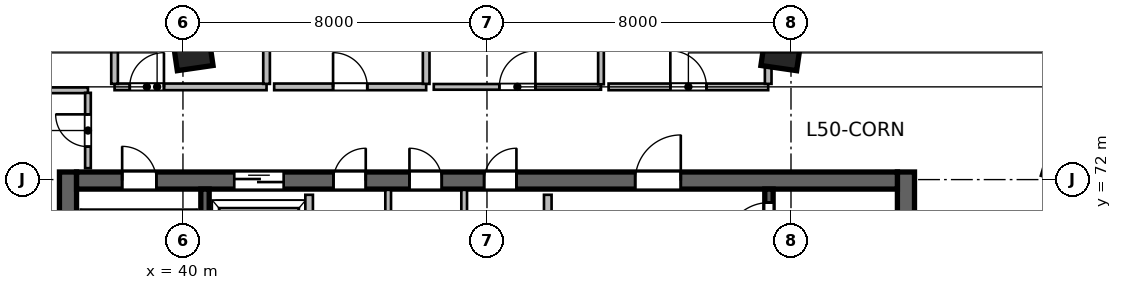
"""IFC4 building model, lengths in metres.
Left out: names, types, materials, properties, quantities, classifications, styles, units other than length and angle.
Written with IfcOpenShell. Run it as: python <this file> out.ifc"""

import sys

from ifc_helpers import new_model, si_unit, direction, frame, frame_2d, origin, origin_2d, place, context, subcontext, project, spatial, rectangle, extrude, source, transform, mapped, element, fill, save


model = new_model("IFC4")
c1 = context("Model", 3, precision=1e-05, world=origin(), true_north=direction((0.0, 1.0)))
c2 = subcontext(c1, "Body", "Model", "MODEL_VIEW")
j1 = project(units=[si_unit("LENGTHUNIT", "METRE"), si_unit("PLANEANGLEUNIT", "RADIAN")], contexts=[c1])
p1 = place(None, origin())
s1 = spatial("IfcSite", under=j1, at=p1, CompositionType="ELEMENT")
p2 = place(p1, origin())
s2 = spatial("IfcBuilding", under=s1, at=p2, CompositionType="ELEMENT")
p3 = place(p2, frame((0.0, 0.0, 207.9)))
s3 = spatial("IfcBuildingStorey", under=s2, at=p3, CompositionType="ELEMENT", Elevation=207.9)
m1 = source(origin(), c2, "Body", "SweptSolid", [
    extrude(rectangle(XDim=12.0, YDim=0.45, at=frame_2d((6.0, 0.0))), origin(), (0.0, 0.0, 1.0), 3.9),
])
for number, where, z_axis, x_axis in (
    (1, (36.975, 60.2, 0.0), (0.0, 0.0, 1.0), (0.0, 1.0, 0.0)),
    (2, (59.025, 60.2, 0.0), (0.0, 0.0, 1.0), (0.0, 1.0, 0.0)),
):
    element("IfcWall", number, at=place(p3, frame(where, z_axis=z_axis, x_axis=x_axis)), inside=s3, PredefinedType="SHEAR", context=c2, shape_type="MappedRepresentation", body=[
        mapped(m1, transform((0.0, 0.0, 0.0), scale=1.0)),
    ])
m2 = source(origin(), c2, "Body", "SweptSolid", [
    extrude(rectangle(XDim=21.6, YDim=0.45, at=frame_2d((10.8, 0.0))), origin(), (0.0, 0.0, 1.0), 3.9),
])
p4 = place(p3, frame((37.2, 71.975, 0.0), z_axis=(0.0, 0.0, 1.0), x_axis=(1.0, 0.0, 0.0)))
e3 = element("IfcWall", 3, at=p4, inside=s3, PredefinedType="SHEAR", context=c2, shape_type="MappedRepresentation", body=[
    mapped(m2, transform((0.0, 0.0, 0.0), scale=1.0)),
])
p5 = place(p4, frame((1.2, 0.0, 0.0)))
e4 = element("IfcOpeningElement", 4, at=p5, cuts=e3, PredefinedType="OPENING", context=c2, shape_type="SweptSolid", body=[
    extrude(rectangle(XDim=0.9, YDim=2.1, at=frame_2d((0.45, 1.05))), frame((0.0, 0.235, 0.0), z_axis=(0.0, -1.0, 0.0), x_axis=(1.0, 0.0, 0.0)), (0.0, 0.0, 1.0), 0.47),
])
p6 = place(p4, frame((14.7, 0.0, 0.0)))
e5 = element("IfcOpeningElement", 5, at=p6, cuts=e3, PredefinedType="OPENING", context=c2, shape_type="SweptSolid", body=[
    extrude(rectangle(XDim=1.2, YDim=2.15, at=frame_2d((0.6, 1.075))), frame((0.0, 0.235, 0.0), z_axis=(0.0, -1.0, 0.0), x_axis=(1.0, 0.0, 0.0)), (0.0, 0.0, 1.0), 0.47),
])
p7 = place(p4, frame((4.15, 0.0, 0.0)))
e6 = element("IfcOpeningElement", 6, at=p7, cuts=e3, PredefinedType="OPENING", context=c2, shape_type="SweptSolid", body=[
    extrude(rectangle(XDim=1.3, YDim=2.15, at=frame_2d((0.65, 1.075))), frame((0.0, 0.235, 0.0), z_axis=(0.0, -1.0, 0.0), x_axis=(1.0, 0.0, 0.0)), (0.0, 0.0, 1.0), 0.47),
])
p8 = place(p4, frame((6.76, 0.0, 0.0)))
e7 = element("IfcOpeningElement", 7, at=p8, cuts=e3, PredefinedType="OPENING", context=c2, shape_type="SweptSolid", body=[
    extrude(rectangle(XDim=0.85, YDim=2.1, at=frame_2d((0.425, 1.05))), frame((0.0, 0.235, 0.0), z_axis=(0.0, -1.0, 0.0), x_axis=(1.0, 0.0, 0.0)), (0.0, 0.0, 1.0), 0.47),
])
p9 = place(p4, frame((8.76, 0.0, 0.0)))
e8 = element("IfcOpeningElement", 8, at=p9, cuts=e3, PredefinedType="OPENING", context=c2, shape_type="SweptSolid", body=[
    extrude(rectangle(XDim=0.85, YDim=2.1, at=frame_2d((0.425, 1.05))), frame((0.0, 0.235, 0.0), z_axis=(0.0, -1.0, 0.0), x_axis=(1.0, 0.0, 0.0)), (0.0, 0.0, 1.0), 0.47),
])
p10 = place(p4, frame((10.725, 0.0, 0.0)))
e9 = element("IfcOpeningElement", 9, at=p10, cuts=e3, PredefinedType="OPENING", context=c2, shape_type="SweptSolid", body=[
    extrude(rectangle(XDim=0.85, YDim=2.1, at=frame_2d((0.425, 1.05))), frame((0.0, 0.235, 0.0), z_axis=(0.0, -1.0, 0.0), x_axis=(1.0, 0.0, 0.0)), (0.0, 0.0, 1.0), 0.47),
])
m3 = source(origin(), c2, "Body", "SweptSolid", [
    extrude(rectangle(XDim=11.1, YDim=0.22, at=frame_2d((5.55, 0.0))), origin(), (0.0, 0.0, 1.0), 3.9),
])
p11 = place(p3, frame((40.58, 60.65, 0.0), z_axis=(0.0, 0.0, 1.0), x_axis=(0.0, 1.0, 0.0)))
e10 = element("IfcWall", 10, at=p11, inside=s3, PredefinedType="SHEAR", context=c2, shape_type="MappedRepresentation", body=[
    mapped(m3, transform((0.0, 0.0, 0.0), scale=1.0)),
])
p12 = place(p3, frame((55.42, 60.65, 0.0), z_axis=(0.0, 0.0, 1.0), x_axis=(0.0, 1.0, 0.0)))
e11 = element("IfcWall", 11, at=p12, inside=s3, PredefinedType="SHEAR", context=c2, shape_type="MappedRepresentation", body=[
    mapped(m3, transform((0.0, 0.0, 0.0), scale=1.0)),
])
p13 = place(p12, frame((9.595, 0.0, 0.0)))
e12 = element("IfcOpeningElement", 12, at=p13, cuts=e11, PredefinedType="OPENING", context=c2, shape_type="SweptSolid", body=[
    extrude(rectangle(XDim=1.15, YDim=2.15, at=frame_2d((0.575, 1.075))), frame((0.0, 0.12, 0.0), z_axis=(0.0, -1.0, 0.0), x_axis=(1.0, 0.0, 0.0)), (0.0, 0.0, 1.0), 0.24),
])
m4 = source(origin(), c2, "Body", "SweptSolid", [
    extrude(rectangle(XDim=0.95, YDim=0.95, at=origin_2d()), origin(), (0.0, 0.0, 1.0), 3.9),
])
for number, where, z_axis, x_axis in (
    (13, (40.253, 75.404, 0.0), (0.0, 0.0, 1.0), (-0.143, 0.99, 0.0)),
    (14, (55.747, 75.404, 0.0), (0.0, 0.0, 1.0), (0.143, 0.99, 0.0)),
):
    element("IfcColumn", number, at=place(p3, frame(where, z_axis=z_axis, x_axis=x_axis)), inside=s3, PredefinedType="COLUMN", context=c2, shape_type="MappedRepresentation", body=[
        mapped(m4, transform((0.0, 0.0, 0.0), scale=1.0)),
    ])
m5 = source(origin(), c2, "Body", "SweptSolid", [
    extrude(rectangle(XDim=5.8, YDim=0.2, at=frame_2d((2.9, 0.0))), origin(), (0.0, 0.0, 1.0), 3.64),
])
p14 = place(p3, frame((49.6, 65.8, 0.0), z_axis=(0.0, 0.0, 1.0), x_axis=(0.0, 1.0, 0.0)))
e15 = element("IfcWall", 15, at=p14, inside=s3, PredefinedType="SOLIDWALL", context=c2, shape_type="MappedRepresentation", body=[
    mapped(m5, transform((0.0, 0.0, 0.0), scale=1.0)),
])
m6 = source(origin(), c2, "Body", "SweptSolid", [
    extrude(rectangle(XDim=3.2, YDim=0.2, at=frame_2d((1.6, 0.0))), origin(), (0.0, 0.0, 1.0), 3.64),
])
p15 = place(p3, frame((43.32, 68.4, 0.0), z_axis=(0.0, 0.0, 1.0), x_axis=(0.0, 1.0, 0.0)))
e16 = element("IfcWall", 16, at=p15, inside=s3, PredefinedType="SOLIDWALL", context=c2, shape_type="MappedRepresentation", body=[
    mapped(m6, transform((0.0, 0.0, 0.0), scale=1.0)),
])
m7 = source(origin(), c2, "Body", "SweptSolid", [
    extrude(rectangle(XDim=3.33, YDim=0.15, at=frame_2d((1.665, 0.0))), origin(), (0.0, 0.0, 1.0), 3.64),
])
for number, where, z_axis, x_axis in (
    (17, (45.4, 68.4, 0.0), (0.0, 0.0, 1.0), (0.0, 1.0, 0.0)),
    (18, (47.4, 68.4, 0.0), (0.0, 0.0, 1.0), (0.0, 1.0, 0.0)),
):
    element("IfcWall", number, at=place(p3, frame(where, z_axis=z_axis, x_axis=x_axis)), inside=s3, PredefinedType="PARTITIONING", context=c2, shape_type="MappedRepresentation", body=[
        mapped(m7, transform((0.0, 0.0, 0.0), scale=1.0)),
    ])
m8 = source(origin(), c2, "Body", "SweptSolid", [
    extrude(rectangle(XDim=3.1, YDim=0.15, at=frame_2d((1.55, 0.0))), origin(), (0.0, 0.0, 1.0), 3.071),
])
p16 = place(p3, frame((34.4, 74.35, 0.0), z_axis=(0.0, 0.0, 1.0), x_axis=(1.0, 0.0, 0.0)))
e19 = element("IfcWall", 19, at=p16, inside=s3, PredefinedType="PARTITIONING", context=c2, shape_type="MappedRepresentation", body=[
    mapped(m8, transform((0.0, 0.0, 0.0), scale=1.0)),
])
m9 = source(origin(), c2, "Body", "SweptSolid", [
    extrude(rectangle(XDim=1.982, YDim=0.15, at=frame_2d((0.991, 0.0))), origin(), (0.0, 0.0, 1.0), 3.64),
])
p17 = place(p3, frame((37.5, 72.3, 0.0), z_axis=(0.0, 0.0, 1.0), x_axis=(0.0, 1.0, 0.0)))
e20 = element("IfcWall", 20, at=p17, inside=s3, PredefinedType="PARTITIONING", context=c2, shape_type="MappedRepresentation", body=[
    mapped(m9, transform((0.0, 0.0, 0.0), scale=1.0)),
])
p18 = place(p17, frame((0.566, 0.0, 0.0)))
e21 = element("IfcOpeningElement", 21, at=p18, cuts=e20, PredefinedType="OPENING", context=c2, shape_type="SweptSolid", body=[
    extrude(rectangle(XDim=0.85, YDim=2.1, at=frame_2d((0.425, 1.05))), frame((0.0, 0.085, 0.0), z_axis=(0.0, -1.0, 0.0), x_axis=(1.0, 0.0, 0.0)), (0.0, 0.0, 1.0), 0.17),
])
m10 = source(origin(), c2, "Body", "SweptSolid", [
    extrude(rectangle(XDim=4.0, YDim=0.175, at=frame_2d((2.0, 0.0))), origin(), (0.0, 0.0, 1.0), 3.64),
])
p19 = place(p3, frame((38.2, 74.44, 0.0), z_axis=(0.0, 0.0, 1.0), x_axis=(1.0, 0.0, 0.0)))
e22 = element("IfcWall", 22, at=p19, inside=s3, PredefinedType="PARTITIONING", context=c2, shape_type="MappedRepresentation", body=[
    mapped(m10, transform((0.0, 0.0, 0.0), scale=1.0)),
])
p20 = place(p19, frame((0.4, 0.0, 0.0)))
e23 = element("IfcOpeningElement", 23, at=p20, cuts=e22, PredefinedType="OPENING", context=c2, shape_type="SweptSolid", body=[
    extrude(rectangle(XDim=0.9, YDim=2.08, at=frame_2d((0.45, 1.04))), frame((0.0, 0.098, 0.0), z_axis=(0.0, -1.0, 0.0), x_axis=(1.0, 0.0, 0.0)), (0.0, 0.0, 1.0), 0.195),
])
m11 = source(origin(), c2, "Body", "SweptSolid", [
    extrude(rectangle(XDim=2.403, YDim=0.175, at=frame_2d((1.201, 0.0))), origin(), (0.0, 0.0, 1.0), 3.64),
])
for number, where, z_axis, x_axis in (
    (24, (38.2, 74.519, 0.0), (0.0, 0.0, 1.0), (0.0, 1.0, 0.0)),
    (25, (42.2, 74.519, 0.0), (0.0, 0.0, 1.0), (0.0, 1.0, 0.0)),
):
    element("IfcWall", number, at=place(p3, frame(where, z_axis=z_axis, x_axis=x_axis)), inside=s3, PredefinedType="PARTITIONING", context=c2, shape_type="MappedRepresentation", body=[
        mapped(m11, transform((0.0, 0.0, 0.0), scale=1.0)),
    ])
p21 = place(p3, frame((42.4, 74.44, 0.0), z_axis=(0.0, 0.0, 1.0), x_axis=(1.0, 0.0, 0.0)))
e26 = element("IfcWall", 26, at=p21, inside=s3, PredefinedType="PARTITIONING", context=c2, shape_type="MappedRepresentation", body=[
    mapped(m10, transform((0.0, 0.0, 0.0), scale=1.0)),
])
p22 = place(p21, frame((1.55, 0.0, 0.0)))
e27 = element("IfcOpeningElement", 27, at=p22, cuts=e26, PredefinedType="OPENING", context=c2, shape_type="SweptSolid", body=[
    extrude(rectangle(XDim=0.9, YDim=2.08, at=frame_2d((0.45, 1.04))), frame((0.0, 0.098, 0.0), z_axis=(0.0, -1.0, 0.0), x_axis=(1.0, 0.0, 0.0)), (0.0, 0.0, 1.0), 0.195),
])
p23 = place(p3, frame((46.4, 74.519, 0.0), z_axis=(0.0, 0.0, 1.0), x_axis=(0.0, 1.0, 0.0)))
e28 = element("IfcWall", 28, at=p23, inside=s3, PredefinedType="PARTITIONING", context=c2, shape_type="MappedRepresentation", body=[
    mapped(m11, transform((0.0, 0.0, 0.0), scale=1.0)),
])
m12 = source(origin(), c2, "Body", "SweptSolid", [
    extrude(rectangle(XDim=4.4, YDim=0.15, at=frame_2d((2.2, 0.0))), origin(), (0.0, 0.0, 1.0), 3.64),
])
p24 = place(p3, frame((46.6, 74.44, 0.0), z_axis=(0.0, 0.0, 1.0), x_axis=(1.0, 0.0, 0.0)))
e29 = element("IfcWall", 29, at=p24, inside=s3, PredefinedType="PARTITIONING", context=c2, shape_type="MappedRepresentation", body=[
    mapped(m12, transform((0.0, 0.0, 0.0), scale=1.0)),
])
p25 = place(p24, frame((1.725, 0.0, 0.0)))
e30 = element("IfcOpeningElement", 30, at=p25, cuts=e29, PredefinedType="OPENING", context=c2, shape_type="SweptSolid", body=[
    extrude(rectangle(XDim=0.95, YDim=2.1, at=frame_2d((0.475, 1.05))), frame((0.0, 0.085, 0.0), z_axis=(0.0, -1.0, 0.0), x_axis=(1.0, 0.0, 0.0)), (0.0, 0.0, 1.0), 0.17),
])
m13 = source(origin(), c2, "Body", "SweptSolid", [
    extrude(rectangle(XDim=2.425, YDim=0.15, at=frame_2d((1.212, 0.0))), origin(), (0.0, 0.0, 1.0), 3.64),
])
p26 = place(p3, frame((51.0, 74.508, 0.0), z_axis=(0.0, 0.0, 1.0), x_axis=(0.0, 1.0, 0.0)))
e31 = element("IfcWall", 31, at=p26, inside=s3, PredefinedType="PARTITIONING", context=c2, shape_type="MappedRepresentation", body=[
    mapped(m13, transform((0.0, 0.0, 0.0), scale=1.0)),
])
m14 = source(origin(), c2, "Body", "SweptSolid", [
    extrude(rectangle(XDim=4.2, YDim=0.175, at=frame_2d((2.1, 0.0))), origin(), (0.0, 0.0, 1.0), 3.64),
])
p27 = place(p3, frame((51.2, 74.44, 0.0), z_axis=(0.0, 0.0, 1.0), x_axis=(1.0, 0.0, 0.0)))
e32 = element("IfcWall", 32, at=p27, inside=s3, PredefinedType="PARTITIONING", context=c2, shape_type="MappedRepresentation", body=[
    mapped(m14, transform((0.0, 0.0, 0.0), scale=1.0)),
])
p28 = place(p27, frame((1.625, 0.0, 0.0)))
e33 = element("IfcOpeningElement", 33, at=p28, cuts=e32, PredefinedType="OPENING", context=c2, shape_type="SweptSolid", body=[
    extrude(rectangle(XDim=0.95, YDim=2.12, at=frame_2d((0.475, 1.06))), frame((0.0, 0.098, 0.0), z_axis=(0.0, -1.0, 0.0), x_axis=(1.0, 0.0, 0.0)), (0.0, 0.0, 1.0), 0.195),
])
p29 = place(p3, frame((55.4, 74.519, 0.0), z_axis=(0.0, 0.0, 1.0), x_axis=(0.0, 1.0, 0.0)))
e34 = element("IfcWall", 34, at=p29, inside=s3, PredefinedType="PARTITIONING", context=c2, shape_type="MappedRepresentation", body=[
    mapped(m11, transform((0.0, 0.0, 0.0), scale=1.0)),
])
m15 = source(origin(), c2, "Body", "SweptSolid", [
    extrude(rectangle(XDim=0.9, YDim=2.1, at=frame_2d((0.45, 1.05))), frame((0.0, 0.025, 0.0), z_axis=(0.0, -1.0, 0.0), x_axis=(1.0, 0.0, 0.0)), (0.0, 0.0, 1.0), 0.05),
])
p30 = place(p5, origin())
e35 = element("IfcDoor", 35, at=p30, inside=s3, OperationType="SINGLE_SWING_LEFT", PredefinedType="DOOR", context=c2, shape_type="MappedRepresentation", body=[
    mapped(m15, transform((0.0, 0.0, 0.0), scale=1.0)),
])
fill(e4, e35)
m16 = source(origin(), c2, "Body", "SweptSolid", [
    extrude(rectangle(XDim=1.15, YDim=2.15, at=frame_2d((0.575, 1.075))), frame((0.0, 0.025, 0.0), z_axis=(0.0, -1.0, 0.0), x_axis=(1.0, 0.0, 0.0)), (0.0, 0.0, 1.0), 0.05),
])
p31 = place(p13, origin())
e36 = element("IfcDoor", 36, at=p31, inside=s3, OperationType="SINGLE_SWING_LEFT", PredefinedType="DOOR", context=c2, shape_type="MappedRepresentation", body=[
    mapped(m16, transform((0.0, 0.0, 0.0), scale=1.0)),
])
fill(e12, e36)
m17 = source(origin(), c2, "Body", "SweptSolid", [
    extrude(rectangle(XDim=1.2, YDim=2.15, at=frame_2d((0.6, 1.075))), frame((0.0, 0.025, 0.0), z_axis=(0.0, -1.0, 0.0), x_axis=(1.0, 0.0, 0.0)), (0.0, 0.0, 1.0), 0.05),
])
p32 = place(p6, origin())
e37 = element("IfcDoor", 37, at=p32, inside=s3, OperationType="SINGLE_SWING_RIGHT", PredefinedType="DOOR", context=c2, shape_type="MappedRepresentation", body=[
    mapped(m17, transform((0.0, 0.0, 0.0), scale=1.0)),
])
fill(e5, e37)
m18 = source(origin(), c2, "Body", "SweptSolid", [
    extrude(rectangle(XDim=1.3, YDim=2.15, at=frame_2d((0.65, 1.075))), frame((0.0, 0.025, 0.0), z_axis=(0.0, -1.0, 0.0), x_axis=(1.0, 0.0, 0.0)), (0.0, 0.0, 1.0), 0.05),
])
p33 = place(p7, origin())
e38 = element("IfcDoor", 38, at=p33, inside=s3, OperationType="DOUBLE_DOOR_SLIDING", PredefinedType="DOOR", context=c2, shape_type="MappedRepresentation", body=[
    mapped(m18, transform((0.0, 0.0, 0.0), scale=1.0)),
])
fill(e6, e38)
m19 = source(origin(), c2, "Body", "SweptSolid", [
    extrude(rectangle(XDim=0.85, YDim=2.1, at=frame_2d((0.425, 1.05))), frame((0.0, 0.025, 0.0), z_axis=(0.0, -1.0, 0.0), x_axis=(1.0, 0.0, 0.0)), (0.0, 0.0, 1.0), 0.05),
])
p34 = place(p8, origin())
e39 = element("IfcDoor", 39, at=p34, inside=s3, OperationType="SINGLE_SWING_RIGHT", PredefinedType="DOOR", context=c2, shape_type="MappedRepresentation", body=[
    mapped(m19, transform((0.0, 0.0, 0.0), scale=1.0)),
])
fill(e7, e39)
p35 = place(p9, origin())
e40 = element("IfcDoor", 40, at=p35, inside=s3, OperationType="SINGLE_SWING_LEFT", PredefinedType="DOOR", context=c2, shape_type="MappedRepresentation", body=[
    mapped(m19, transform((0.0, 0.0, 0.0), scale=1.0)),
])
fill(e8, e40)
p36 = place(p10, origin())
e41 = element("IfcDoor", 41, at=p36, inside=s3, OperationType="SINGLE_SWING_RIGHT", PredefinedType="DOOR", context=c2, shape_type="MappedRepresentation", body=[
    mapped(m19, transform((0.0, 0.0, 0.0), scale=1.0)),
])
fill(e9, e41)
p37 = place(p18, origin())
e42 = element("IfcDoor", 42, at=p37, inside=s3, OperationType="SINGLE_SWING_RIGHT", PredefinedType="DOOR", context=c2, shape_type="MappedRepresentation", body=[
    mapped(m19, transform((0.0, 0.0, 0.0), scale=1.0)),
])
fill(e21, e42)
m20 = source(origin(), c2, "Body", "SweptSolid", [
    extrude(rectangle(XDim=0.9, YDim=2.08, at=frame_2d((0.45, 1.04))), frame((0.0, 0.025, 0.0), z_axis=(0.0, -1.0, 0.0), x_axis=(1.0, 0.0, 0.0)), (0.0, 0.0, 1.0), 0.05),
])
p38 = place(p20, origin())
e43 = element("IfcDoor", 43, at=p38, inside=s3, OperationType="SINGLE_SWING_RIGHT", PredefinedType="DOOR", context=c2, shape_type="MappedRepresentation", body=[
    mapped(m20, transform((0.0, 0.0, 0.0), scale=1.0)),
])
fill(e23, e43)
p39 = place(p22, origin())
e44 = element("IfcDoor", 44, at=p39, inside=s3, OperationType="SINGLE_SWING_LEFT", PredefinedType="DOOR", context=c2, shape_type="MappedRepresentation", body=[
    mapped(m20, transform((0.0, 0.0, 0.0), scale=1.0)),
])
fill(e27, e44)
m21 = source(origin(), c2, "Body", "SweptSolid", [
    extrude(rectangle(XDim=0.95, YDim=2.1, at=frame_2d((0.475, 1.05))), frame((0.0, 0.025, 0.0), z_axis=(0.0, -1.0, 0.0), x_axis=(1.0, 0.0, 0.0)), (0.0, 0.0, 1.0), 0.05),
])
p40 = place(p25, origin())
e45 = element("IfcDoor", 45, at=p40, inside=s3, OperationType="SINGLE_SWING_RIGHT", PredefinedType="DOOR", context=c2, shape_type="MappedRepresentation", body=[
    mapped(m21, transform((0.0, 0.0, 0.0), scale=1.0)),
])
fill(e30, e45)
m22 = source(origin(), c2, "Body", "SweptSolid", [
    extrude(rectangle(XDim=0.95, YDim=2.12, at=frame_2d((0.475, 1.06))), frame((0.0, 0.025, 0.0), z_axis=(0.0, -1.0, 0.0), x_axis=(1.0, 0.0, 0.0)), (0.0, 0.0, 1.0), 0.05),
])
p41 = place(p28, origin())
e46 = element("IfcDoor", 46, at=p41, inside=s3, OperationType="SINGLE_SWING_LEFT", PredefinedType="DOOR", context=c2, shape_type="MappedRepresentation", body=[
    mapped(m22, transform((0.0, 0.0, 0.0), scale=1.0)),
])
fill(e33, e46)
save(model, sys.argv[1])
